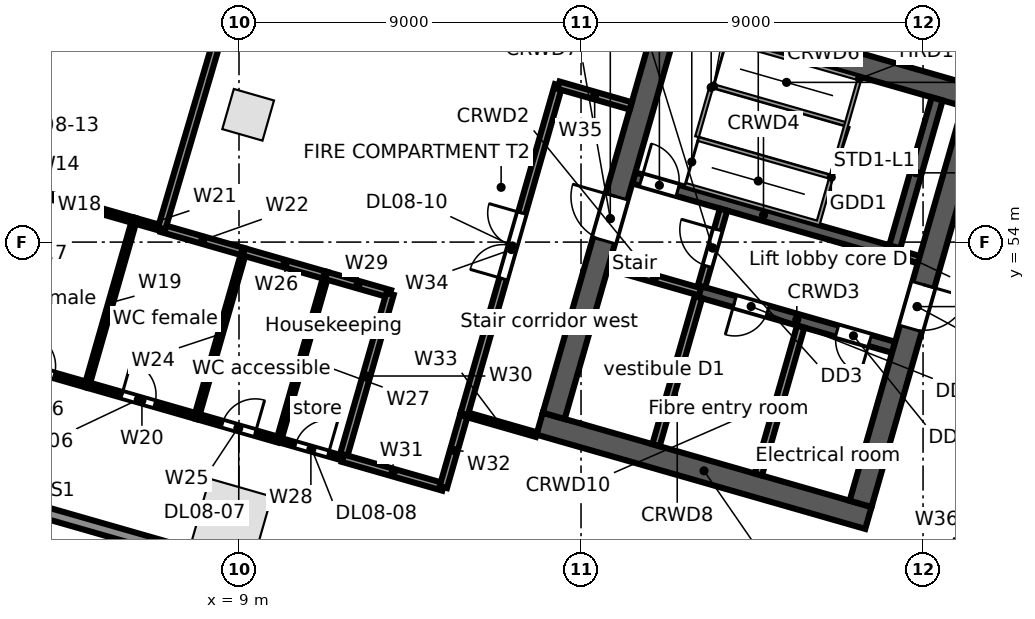
"""IFC4 building model, lengths in metres.
Left out: names, types, materials, properties, quantities, classifications, styles, units other than length and angle.
Written with IfcOpenShell. Run it as: python <this file> out.ifc"""

import sys

from ifc_helpers import new_model, si_unit, direction, frame, frame_2d, origin, origin_2d, place, context, subcontext, project, spatial, rectangle, extrude, element, fill, save


model = new_model("IFC4")
c1 = context("Model", 3, precision=1e-05, world=origin(), true_north=direction((0.0, 1.0)))
c2 = subcontext(c1, "Body", "Model", "MODEL_VIEW")
j1 = project(units=[si_unit("LENGTHUNIT", "METRE"), si_unit("PLANEANGLEUNIT", "RADIAN")], contexts=[c1])
p1 = place(None, origin())
s1 = spatial("IfcSite", under=j1, at=p1, CompositionType="ELEMENT")
p2 = place(p1, origin())
s2 = spatial("IfcBuilding", under=s1, at=p2, CompositionType="ELEMENT")
p3 = place(p2, frame((0.0, 0.0, 41.5)))
s3 = spatial("IfcBuildingStorey", under=s2, at=p3, CompositionType="ELEMENT", Elevation=41.5)
p4 = place(p3, frame((8.81, 46.722, 0.0), z_axis=(0.0, 0.0, 1.0), x_axis=(0.961261695938, -0.275637355817, 0.0)))
e1 = element("IfcColumn", 1, at=p4, inside=s3, PredefinedType="COLUMN", context=c2, shape_type="SweptSolid", body=[
    extrude(rectangle(XDim=1.7, YDim=1.7, at=origin_2d()), origin(), (0.0, 0.0, 1.0), 5.0),
])
p5 = place(p3, frame((9.241, 57.35, 0.0), z_axis=(0.0, 0.0, 1.0), x_axis=(0.961261695938, -0.275637355817, 0.0)))
e2 = element("IfcColumn", 2, at=p5, inside=s3, PredefinedType="COLUMN", context=c2, shape_type="SweptSolid", body=[
    extrude(rectangle(XDim=1.1, YDim=1.1, at=origin_2d()), origin(), (0.0, 0.0, 1.0), 5.0),
])
p6 = place(p3, frame((25.398, 40.717, 0.0), z_axis=(0.0, 0.0, 1.0), x_axis=(-0.961262423262, 0.275634819324, 0.0)))
e3 = element("IfcWall", 3, at=p6, inside=s3, PredefinedType="STANDARD", context=c2, shape_type="SweptSolid", body=[
    extrude(rectangle(XDim=26.359, YDim=0.3, at=frame_2d((13.179, 0.0))), origin(), (0.0, 0.0, 1.0), 4.68),
])
p7 = place(p6, frame((22.664, 0.0, 0.6)))
e4 = element("IfcOpeningElement", 4, at=p7, cuts=e3, PredefinedType="OPENING", context=c2, shape_type="SweptSolid", body=[
    extrude(rectangle(XDim=0.9, YDim=3.2, at=frame_2d((0.45, 1.6))), frame((0.0, 0.16, 0.0), z_axis=(0.0, -1.0, 0.0), x_axis=(1.0, 0.0, 0.0)), (0.0, 0.0, 1.0), 0.32),
])
p8 = place(p6, frame((13.844, 0.0, 0.6)))
e5 = element("IfcOpeningElement", 5, at=p8, cuts=e3, PredefinedType="OPENING", context=c2, shape_type="SweptSolid", body=[
    extrude(rectangle(XDim=0.9, YDim=3.2, at=frame_2d((0.45, 1.6))), frame((0.0, 0.16, 0.0), z_axis=(0.0, -1.0, 0.0), x_axis=(1.0, 0.0, 0.0)), (0.0, 0.0, 1.0), 0.32),
])
p9 = place(p6, frame((5.023, 0.0, 0.6)))
e6 = element("IfcOpeningElement", 6, at=p9, cuts=e3, PredefinedType="OPENING", context=c2, shape_type="SweptSolid", body=[
    extrude(rectangle(XDim=0.9, YDim=3.2, at=frame_2d((0.45, 1.6))), frame((0.0, 0.16, 0.0), z_axis=(0.0, -1.0, 0.0), x_axis=(1.0, 0.0, 0.0)), (0.0, 0.0, 1.0), 0.32),
])
p10 = place(p3, frame((16.911, 49.221, 0.0), z_axis=(0.0, 0.0, 1.0), x_axis=(0.96126248289, -0.275634611374, 0.0)))
e7 = element("IfcWall", 7, at=p10, inside=s3, PredefinedType="SOLIDWALL", context=c2, shape_type="SweptSolid", body=[
    extrude(rectangle(XDim=9.0, YDim=0.6, at=frame_2d((4.5, 0.0))), origin(), (0.0, 0.0, 1.0), 4.68),
])
p11 = place(p3, frame((18.728, 53.382, 0.0), z_axis=(0.0, 0.0, 1.0), x_axis=(0.961247070632, -0.275688355216, 0.0)))
e8 = element("IfcWall", 8, at=p11, inside=s3, PredefinedType="SOLIDWALL", context=c2, shape_type="SweptSolid", body=[
    extrude(rectangle(XDim=2.5, YDim=0.2, at=frame_2d((1.25, 0.0))), origin(), (0.0, 0.0, 1.0), 4.68),
])
p12 = place(p3, frame((21.131, 52.692, 0.0), z_axis=(0.0, 0.0, 1.0), x_axis=(0.961271492568, -0.275603188616, 0.0)))
e9 = element("IfcWall", 9, at=p12, inside=s3, PredefinedType="SOLIDWALL", context=c2, shape_type="SweptSolid", body=[
    extrude(rectangle(XDim=5.3, YDim=0.3, at=frame_2d((2.65, 0.0))), origin(), (0.0, 0.0, 1.0), 4.68),
])
p13 = place(p12, frame((0.95, 0.0, 0.0)))
e10 = element("IfcOpeningElement", 10, at=p13, cuts=e9, PredefinedType="OPENING", context=c2, shape_type="SweptSolid", body=[
    extrude(rectangle(XDim=0.9, YDim=2.1, at=frame_2d((0.45, 1.05))), frame((0.0, 0.16, 0.0), z_axis=(0.0, -1.0, 0.0), x_axis=(1.0, 0.0, 0.0)), (0.0, 0.0, 1.0), 0.32),
])
p14 = place(p12, frame((3.75, 0.0, 0.0)))
e11 = element("IfcOpeningElement", 11, at=p14, cuts=e9, PredefinedType="OPENING", context=c2, shape_type="SweptSolid", body=[
    extrude(rectangle(XDim=0.9, YDim=2.1, at=frame_2d((0.45, 1.05))), frame((0.0, 0.16, 0.0), z_axis=(0.0, -1.0, 0.0), x_axis=(1.0, 0.0, 0.0)), (0.0, 0.0, 1.0), 0.32),
])
p15 = place(p3, frame((19.389, 55.689, 0.0), z_axis=(0.0, 0.0, 1.0), x_axis=(0.961261397636, -0.275638396117, 0.0)))
e12 = element("IfcWall", 12, at=p15, inside=s3, PredefinedType="SOLIDWALL", context=c2, shape_type="SweptSolid", body=[
    extrude(rectangle(XDim=7.1, YDim=0.3, at=frame_2d((3.55, 0.0))), origin(), (0.0, 0.0, 1.0), 4.68),
])
p16 = place(p15, frame((0.2, 0.0, 0.0)))
e13 = element("IfcOpeningElement", 13, at=p16, cuts=e12, PredefinedType="OPENING", context=c2, shape_type="SweptSolid", body=[
    extrude(rectangle(XDim=1.0, YDim=2.1, at=frame_2d((0.5, 1.05))), frame((0.0, 0.16, 0.0), z_axis=(0.0, -1.0, 0.0), x_axis=(1.0, 0.0, 0.0)), (0.0, 0.0, 1.0), 0.32),
])
p17 = place(p3, frame((26.214, 53.732, 0.0), z_axis=(0.0, 0.0, 1.0), x_axis=(0.96122076476, -0.27578005982, 0.0)))
e14 = element("IfcWall", 14, at=p17, inside=s3, PredefinedType="SOLIDWALL", context=c2, shape_type="SweptSolid", body=[
    extrude(rectangle(XDim=0.7, YDim=0.2, at=frame_2d((0.35, 0.0))), origin(), (0.0, 0.0, 1.0), 4.68),
])
p18 = place(p3, frame((20.053, 60.18, 0.0), z_axis=(0.0, 0.0, 1.0), x_axis=(0.96126248289, -0.275634611374, 0.0)))
e15 = element("IfcWall", 15, at=p18, inside=s3, PredefinedType="SOLIDWALL", context=c2, shape_type="SweptSolid", body=[
    extrude(rectangle(XDim=9.0, YDim=0.6, at=frame_2d((4.5, 0.0))), origin(), (0.0, 0.0, 1.0), 4.68),
])
p19 = place(p3, frame((17.282, 49.427, 0.0), z_axis=(0.0, 0.0, 1.0), x_axis=(0.275631631629, 0.961263337304, 0.0)))
e16 = element("IfcWall", 16, at=p19, inside=s3, PredefinedType="SOLIDWALL", context=c2, shape_type="SweptSolid", body=[
    extrude(rectangle(XDim=10.8, YDim=0.6, at=frame_2d((5.4, 0.0))), origin(), (0.0, 0.0, 1.0), 4.68),
])
p20 = place(p19, frame((4.8, 0.0, 0.0)))
e17 = element("IfcOpeningElement", 17, at=p20, cuts=e16, PredefinedType="OPENING", context=c2, shape_type="SweptSolid", body=[
    extrude(rectangle(XDim=1.2, YDim=2.1, at=frame_2d((0.6, 1.05))), frame((0.0, 0.31, 0.0), z_axis=(0.0, -1.0, 0.0), x_axis=(1.0, 0.0, 0.0)), (0.0, 0.0, 1.0), 0.62),
])
p21 = place(p3, frame((19.973, 48.655, 0.0), z_axis=(0.0, 0.0, 1.0), x_axis=(0.275668441653, 0.961252781674, 0.0)))
e18 = element("IfcWall", 18, at=p21, inside=s3, PredefinedType="SOLIDWALL", context=c2, shape_type="SweptSolid", body=[
    extrude(rectangle(XDim=4.05, YDim=0.2, at=frame_2d((2.025, 0.0))), origin(), (0.0, 0.0, 1.0), 4.68),
])
p22 = place(p3, frame((21.172, 52.837, 0.0), z_axis=(0.0, 0.0, 1.0), x_axis=(0.275657676022, 0.961255868981, 0.0)))
e19 = element("IfcWall", 19, at=p22, inside=s3, PredefinedType="PARTITIONING", context=c2, shape_type="SweptSolid", body=[
    extrude(rectangle(XDim=2.1, YDim=0.2, at=frame_2d((1.05, 0.0))), origin(), (0.0, 0.0, 1.0), 4.68),
])
p23 = place(p22, frame((0.55, 0.0, 0.0)))
e20 = element("IfcOpeningElement", 20, at=p23, cuts=e19, PredefinedType="OPENING", context=c2, shape_type="SweptSolid", body=[
    extrude(rectangle(XDim=1.0, YDim=2.1, at=frame_2d((0.5, 1.05))), frame((0.0, 0.11, 0.0), z_axis=(0.0, -1.0, 0.0), x_axis=(1.0, 0.0, 0.0)), (0.0, 0.0, 1.0), 0.22),
])
p24 = place(p3, frame((22.665, 47.883, 0.0), z_axis=(0.0, 0.0, 1.0), x_axis=(0.275596769212, 0.961273333033, 0.0)))
e21 = element("IfcWall", 21, at=p24, inside=s3, PredefinedType="PARTITIONING", context=c2, shape_type="SweptSolid", body=[
    extrude(rectangle(XDim=4.05, YDim=0.2, at=frame_2d((2.025, 0.0))), origin(), (0.0, 0.0, 1.0), 4.68),
])
p25 = place(p3, frame((26.256, 53.876, 0.0), z_axis=(0.0, 0.0, 1.0), x_axis=(0.275612739511, 0.961268754209, 0.0)))
e22 = element("IfcWall", 22, at=p25, inside=s3, PredefinedType="SOLIDWALL", context=c2, shape_type="SweptSolid", body=[
    extrude(rectangle(XDim=4.05, YDim=0.3, at=frame_2d((2.025, 0.0))), origin(), (0.0, 0.0, 1.0), 4.68),
])
p26 = place(p3, frame((25.356, 47.112, 0.0), z_axis=(0.0, 0.0, 1.0), x_axis=(0.275631631629, 0.961263337304, 0.0)))
e23 = element("IfcWall", 23, at=p26, inside=s3, PredefinedType="SOLIDWALL", context=c2, shape_type="SweptSolid", body=[
    extrude(rectangle(XDim=10.8, YDim=0.6, at=frame_2d((5.4, 0.0))), origin(), (0.0, 0.0, 1.0), 4.68),
])
p27 = place(p26, frame((4.8, 0.0, 0.0)))
e24 = element("IfcOpeningElement", 24, at=p27, cuts=e23, PredefinedType="OPENING", context=c2, shape_type="SweptSolid", body=[
    extrude(rectangle(XDim=1.2, YDim=2.1, at=frame_2d((0.6, 1.05))), frame((0.0, 0.31, 0.0), z_axis=(0.0, -1.0, 0.0), x_axis=(1.0, 0.0, 0.0)), (0.0, 0.0, 1.0), 0.62),
])
p28 = place(p3, frame((2.601, 50.932, 0.0), z_axis=(0.0, 0.0, 1.0), x_axis=(0.961265528111, -0.275623991092, 0.0)))
e25 = element("IfcWall", 25, at=p28, inside=s3, PredefinedType="PARTITIONING", context=c2, shape_type="SweptSolid", body=[
    extrude(rectangle(XDim=2.5, YDim=0.15, at=frame_2d((1.25, 0.0))), origin(), (0.0, 0.0, 1.0), 4.68),
])
p29 = place(p28, frame((0.7, 0.0, 0.0)))
e26 = element("IfcOpeningElement", 26, at=p29, cuts=e25, PredefinedType="OPENING", context=c2, shape_type="SweptSolid", body=[
    extrude(rectangle(XDim=0.9, YDim=2.1, at=frame_2d((0.45, 1.05))), frame((0.0, 0.085, 0.0), z_axis=(0.0, -1.0, 0.0), x_axis=(1.0, 0.0, 0.0)), (0.0, 0.0, 1.0), 0.17),
])
p30 = place(p3, frame((3.361, 55.395, 0.0), z_axis=(0.0, 0.0, 1.0), x_axis=(0.961268664977, -0.27561305073, 0.0)))
e27 = element("IfcWall", 27, at=p30, inside=s3, PredefinedType="PARTITIONING", context=c2, shape_type="SweptSolid", body=[
    extrude(rectangle(XDim=3.0, YDim=0.15, at=frame_2d((1.5, 0.0))), origin(), (0.0, 0.0, 1.0), 4.68),
])
p31 = place(p3, frame((5.004, 50.243, 0.0), z_axis=(0.0, 0.0, 1.0), x_axis=(0.275838825927, 0.961203902464, 0.0)))
e28 = element("IfcWall", 28, at=p31, inside=s3, PredefinedType="PARTITIONING", context=c2, shape_type="SweptSolid", body=[
    extrude(rectangle(XDim=4.5, YDim=0.125, at=frame_2d((2.25, 0.0))), origin(), (0.0, 0.0, 1.0), 4.68),
])
p32 = place(p3, frame((5.004, 50.243, 0.0), z_axis=(0.0, 0.0, 1.0), x_axis=(0.961268664977, -0.27561305073, 0.0)))
e29 = element("IfcWall", 29, at=p32, inside=s3, PredefinedType="PARTITIONING", context=c2, shape_type="SweptSolid", body=[
    extrude(rectangle(XDim=3.0, YDim=0.15, at=frame_2d((1.5, 0.0))), origin(), (0.0, 0.0, 1.0), 4.68),
])
p33 = place(p32, frame((0.95, 0.0, 0.0)))
e30 = element("IfcOpeningElement", 30, at=p33, cuts=e29, PredefinedType="OPENING", context=c2, shape_type="SweptSolid", body=[
    extrude(rectangle(XDim=0.9, YDim=2.1, at=frame_2d((0.45, 1.05))), frame((0.0, 0.085, 0.0), z_axis=(0.0, -1.0, 0.0), x_axis=(1.0, 0.0, 0.0)), (0.0, 0.0, 1.0), 0.17),
])
p34 = place(p3, frame((6.245, 54.568, 0.0), z_axis=(0.0, 0.0, 1.0), x_axis=(0.961499370144, -0.274807134575, 0.0)))
e31 = element("IfcWall", 31, at=p34, inside=s3, PredefinedType="PARTITIONING", context=c2, shape_type="SweptSolid", body=[
    extrude(rectangle(XDim=0.75, YDim=0.15, at=frame_2d((0.375, 0.0))), origin(), (0.0, 0.0, 1.0), 4.68),
])
p35 = place(p3, frame((6.966, 54.362, 0.0), z_axis=(0.0, 0.0, 1.0), x_axis=(0.961154610169, -0.276010534854, 0.0)))
e32 = element("IfcWall", 32, at=p35, inside=s3, PredefinedType="PARTITIONING", context=c2, shape_type="SweptSolid", body=[
    extrude(rectangle(XDim=2.25, YDim=0.2, at=frame_2d((1.125, 0.0))), origin(), (0.0, 0.0, 1.0), 3.852),
])
p36 = place(p3, frame((6.966, 54.362, 0.0), z_axis=(0.0, 0.0, 1.0), x_axis=(0.283027392509, 0.959111826165, 0.0)))
e33 = element("IfcWall", 33, at=p36, inside=s3, PredefinedType="PARTITIONING", context=c2, shape_type="SweptSolid", body=[
    extrude(rectangle(XDim=12.985, YDim=0.2, at=frame_2d((6.492, 0.0))), origin(), (0.0, 0.0, 1.0), 3.742),
])
p37 = place(p3, frame((7.888, 49.416, 0.0), z_axis=(0.0, 0.0, 1.0), x_axis=(0.275803080638, 0.96121415965, 0.0)))
e34 = element("IfcWall", 34, at=p37, inside=s3, PredefinedType="PARTITIONING", context=c2, shape_type="SweptSolid", body=[
    extrude(rectangle(XDim=4.5, YDim=0.125, at=frame_2d((2.25, 0.0))), origin(), (0.0, 0.0, 1.0), 3.852),
])
p38 = place(p3, frame((7.888, 49.416, 0.0), z_axis=(0.0, 0.0, 1.0), x_axis=(0.9611628742, -0.275981755301, 0.0)))
e35 = element("IfcWall", 35, at=p38, inside=s3, PredefinedType="PARTITIONING", context=c2, shape_type="SweptSolid", body=[
    extrude(rectangle(XDim=2.25, YDim=0.15, at=frame_2d((1.125, 0.0))), origin(), (0.0, 0.0, 1.0), 3.742),
])
p39 = place(p38, frame((0.7, 0.0, 0.0)))
e36 = element("IfcOpeningElement", 36, at=p39, cuts=e35, PredefinedType="OPENING", context=c2, shape_type="SweptSolid", body=[
    extrude(rectangle(XDim=0.9, YDim=2.1, at=frame_2d((0.45, 1.05))), frame((0.0, 0.085, 0.0), z_axis=(0.0, -1.0, 0.0), x_axis=(1.0, 0.0, 0.0)), (0.0, 0.0, 1.0), 0.17),
])
p40 = place(p3, frame((9.129, 53.741, 0.0), z_axis=(0.0, 0.0, 1.0), x_axis=(0.961273691875, -0.275595517578, 0.0)))
e37 = element("IfcWall", 37, at=p40, inside=s3, PredefinedType="PARTITIONING", context=c2, shape_type="SweptSolid", body=[
    extrude(rectangle(XDim=2.249, YDim=0.2, at=frame_2d((1.125, 0.0))), origin(), (0.0, 0.0, 1.0), 3.742),
])
p41 = place(p3, frame((10.051, 48.795, 0.0), z_axis=(0.0, 0.0, 1.0), x_axis=(0.275530671241, 0.961292280841, 0.0)))
e38 = element("IfcWall", 38, at=p41, inside=s3, PredefinedType="PARTITIONING", context=c2, shape_type="SweptSolid", body=[
    extrude(rectangle(XDim=4.5, YDim=0.125, at=frame_2d((2.25, 0.0))), origin(), (0.0, 0.0, 1.0), 4.68),
])
p42 = place(p3, frame((10.051, 48.795, 0.0), z_axis=(0.0, 0.0, 1.0), x_axis=(0.961313033798, -0.275458256455, 0.0)))
e39 = element("IfcWall", 39, at=p42, inside=s3, PredefinedType="PARTITIONING", context=c2, shape_type="SweptSolid", body=[
    extrude(rectangle(XDim=1.75, YDim=0.125, at=frame_2d((0.875, 0.0))), origin(), (0.0, 0.0, 1.0), 4.68),
])
p43 = place(p42, frame((0.45, 0.0, 0.0)))
e40 = element("IfcOpeningElement", 40, at=p43, cuts=e39, PredefinedType="OPENING", context=c2, shape_type="SweptSolid", body=[
    extrude(rectangle(XDim=0.9, YDim=2.1, at=frame_2d((0.45, 1.05))), frame((0.0, 0.073, 0.0), z_axis=(0.0, -1.0, 0.0), x_axis=(1.0, 0.0, 0.0)), (0.0, 0.0, 1.0), 0.145),
])
p44 = place(p3, frame((11.291, 53.121, 0.0), z_axis=(0.0, 0.0, 1.0), x_axis=(0.961329010357, -0.275402494264, 0.0)))
e41 = element("IfcWall", 41, at=p44, inside=s3, PredefinedType="PARTITIONING", context=c2, shape_type="SweptSolid", body=[
    extrude(rectangle(XDim=1.751, YDim=0.2, at=frame_2d((0.875, 0.0))), origin(), (0.0, 0.0, 1.0), 4.68),
])
p45 = place(p3, frame((11.733, 48.313, 0.0), z_axis=(0.0, 0.0, 1.0), x_axis=(0.275795676316, 0.961216284155, 0.0)))
e42 = element("IfcWall", 42, at=p45, inside=s3, PredefinedType="PARTITIONING", context=c2, shape_type="SweptSolid", body=[
    extrude(rectangle(XDim=4.5, YDim=0.2, at=frame_2d((2.25, 0.0))), origin(), (0.0, 0.0, 1.0), 4.68),
])
p46 = place(p3, frame((11.733, 48.313, 0.0), z_axis=(0.0, 0.0, 1.0), x_axis=(0.961272337704, -0.275600240865, 0.0)))
e43 = element("IfcWall", 43, at=p46, inside=s3, PredefinedType="PARTITIONING", context=c2, shape_type="SweptSolid", body=[
    extrude(rectangle(XDim=2.75, YDim=0.2, at=frame_2d((1.375, 0.0))), origin(), (0.0, 0.0, 1.0), 4.68),
])
p47 = place(p3, frame((14.377, 47.555, 0.0), z_axis=(0.0, 0.0, 1.0), x_axis=(0.275446387355, 0.961316434736, 0.0)))
e44 = element("IfcWall", 44, at=p47, inside=s3, PredefinedType="PARTITIONING", context=c2, shape_type="SweptSolid", body=[
    extrude(rectangle(XDim=2.0, YDim=0.2, at=frame_2d((1.0, 0.0))), origin(), (0.0, 0.0, 1.0), 4.68),
])
p48 = place(p3, frame((14.928, 49.478, 0.0), z_axis=(0.0, 0.0, 1.0), x_axis=(0.961243778232, -0.27569983462, 0.0)))
e45 = element("IfcWall", 45, at=p48, inside=s3, PredefinedType="PARTITIONING", context=c2, shape_type="SweptSolid", body=[
    extrude(rectangle(XDim=1.977, YDim=0.125, at=frame_2d((0.988, 0.0))), origin(), (0.0, 0.0, 1.0), 4.68),
])
p49 = place(p3, frame((14.928, 49.478, 0.0), z_axis=(0.0, 0.0, 1.0), x_axis=(0.275674053528, 0.961251172281, 0.0)))
e46 = element("IfcWall", 46, at=p49, inside=s3, PredefinedType="PARTITIONING", context=c2, shape_type="SweptSolid", body=[
    extrude(rectangle(XDim=9.0, YDim=0.2, at=frame_2d((4.5, 0.0))), origin(), (0.0, 0.0, 1.0), 3.742),
])
p50 = place(p49, frame((3.7, 0.0, 0.0)))
e47 = element("IfcOpeningElement", 47, at=p50, cuts=e46, PredefinedType="OPENING", context=c2, shape_type="SweptSolid", body=[
    extrude(rectangle(XDim=1.8, YDim=2.1, at=frame_2d((0.9, 1.05))), frame((0.0, 0.11, 0.0), z_axis=(0.0, -1.0, 0.0), x_axis=(1.0, 0.0, 0.0)), (0.0, 0.0, 1.0), 0.22),
])
p51 = place(p3, frame((17.409, 58.129, 0.0), z_axis=(0.0, 0.0, 1.0), x_axis=(0.961253165474, -0.275667103345, 0.0)))
e48 = element("IfcWall", 48, at=p51, inside=s3, PredefinedType="PARTITIONING", context=c2, shape_type="SweptSolid", body=[
    extrude(rectangle(XDim=1.977, YDim=0.2, at=frame_2d((0.988, 0.0))), origin(), (0.0, 0.0, 1.0), 4.68),
])
p52 = place(p3, frame((26.456, 42.338, 0.0), z_axis=(0.0, 0.0, 1.0), x_axis=(0.52980027265, 0.848122438743, 0.0)))
e49 = element("IfcWall", 49, at=p52, inside=s3, PredefinedType="PARTITIONING", context=c2, shape_type="SweptSolid", body=[
    extrude(rectangle(XDim=6.076, YDim=0.25, at=frame_2d((3.038, 0.0))), origin(), (0.0, 0.0, 1.0), 4.68),
])
p53 = place(p52, frame((2.2, 0.0, 0.0)))
e50 = element("IfcOpeningElement", 50, at=p53, cuts=e49, PredefinedType="OPENING", context=c2, shape_type="SweptSolid", body=[
    extrude(rectangle(XDim=1.8, YDim=2.1, at=frame_2d((0.9, 1.05))), frame((0.0, 0.135, 0.0), z_axis=(0.0, -1.0, 0.0), x_axis=(1.0, 0.0, 0.0)), (0.0, 0.0, 1.0), 0.27),
])
p54 = place(p16, origin())
e51 = element("IfcDoor", 51, at=p54, inside=s3, OperationType="SINGLE_SWING_LEFT", PredefinedType="DOOR", context=c2, shape_type="SweptSolid", body=[
    extrude(rectangle(XDim=1.0, YDim=2.1, at=frame_2d((0.5, 1.05))), frame((0.0, 0.025, 0.0), z_axis=(0.0, -1.0, 0.0), x_axis=(1.0, 0.0, 0.0)), (0.0, 0.0, 1.0), 0.05),
])
fill(e13, e51)
p55 = place(p23, origin())
e52 = element("IfcDoor", 52, at=p55, inside=s3, OperationType="SINGLE_SWING_RIGHT", PredefinedType="DOOR", context=c2, shape_type="SweptSolid", body=[
    extrude(rectangle(XDim=1.0, YDim=2.1, at=frame_2d((0.5, 1.05))), frame((0.0, 0.025, 0.0), z_axis=(0.0, -1.0, 0.0), x_axis=(1.0, 0.0, 0.0)), (0.0, 0.0, 1.0), 0.05),
])
fill(e20, e52)
p56 = place(p20, origin())
e53 = element("IfcDoor", 53, at=p56, inside=s3, OperationType="SINGLE_SWING_RIGHT", PredefinedType="DOOR", context=c2, shape_type="SweptSolid", body=[
    extrude(rectangle(XDim=1.2, YDim=2.1, at=frame_2d((0.6, 1.05))), frame((0.0, 0.025, 0.0), z_axis=(0.0, -1.0, 0.0), x_axis=(1.0, 0.0, 0.0)), (0.0, 0.0, 1.0), 0.05),
])
fill(e17, e53)
p57 = place(p27, frame((1.2, 0.0, 0.0), z_axis=(0.0, 0.0, 1.0), x_axis=(-1.0, 0.0, 0.0)))
e54 = element("IfcDoor", 54, at=p57, inside=s3, OperationType="SINGLE_SWING_LEFT", PredefinedType="DOOR", context=c2, shape_type="SweptSolid", body=[
    extrude(rectangle(XDim=1.2, YDim=2.1, at=frame_2d((0.6, 1.05))), frame((0.0, 0.025, 0.0), z_axis=(0.0, -1.0, 0.0), x_axis=(1.0, 0.0, 0.0)), (0.0, 0.0, 1.0), 0.05),
])
fill(e24, e54)
p58 = place(p13, frame((0.9, 0.0, 0.0), z_axis=(0.0, 0.0, 1.0), x_axis=(-1.0, 0.0, 0.0)))
e55 = element("IfcDoor", 55, at=p58, inside=s3, OperationType="SINGLE_SWING_RIGHT", PredefinedType="DOOR", context=c2, shape_type="SweptSolid", body=[
    extrude(rectangle(XDim=0.9, YDim=2.1, at=frame_2d((0.45, 1.05))), frame((0.0, 0.025, 0.0), z_axis=(0.0, -1.0, 0.0), x_axis=(1.0, 0.0, 0.0)), (0.0, 0.0, 1.0), 0.05),
])
fill(e10, e55)
p59 = place(p14, frame((0.9, 0.0, 0.0), z_axis=(0.0, 0.0, 1.0), x_axis=(-1.0, 0.0, 0.0)))
e56 = element("IfcDoor", 56, at=p59, inside=s3, OperationType="SINGLE_SWING_LEFT", PredefinedType="DOOR", context=c2, shape_type="SweptSolid", body=[
    extrude(rectangle(XDim=0.9, YDim=2.1, at=frame_2d((0.45, 1.05))), frame((0.0, 0.025, 0.0), z_axis=(0.0, -1.0, 0.0), x_axis=(1.0, 0.0, 0.0)), (0.0, 0.0, 1.0), 0.05),
])
fill(e11, e56)
p60 = place(p29, origin())
e57 = element("IfcDoor", 57, at=p60, inside=s3, OperationType="SINGLE_SWING_LEFT", PredefinedType="DOOR", context=c2, shape_type="SweptSolid", body=[
    extrude(rectangle(XDim=0.9, YDim=2.1, at=frame_2d((0.45, 1.05))), frame((0.0, 0.025, 0.0), z_axis=(0.0, -1.0, 0.0), x_axis=(1.0, 0.0, 0.0)), (0.0, 0.0, 1.0), 0.05),
])
fill(e26, e57)
p61 = place(p33, origin())
e58 = element("IfcDoor", 58, at=p61, inside=s3, OperationType="SINGLE_SWING_LEFT", PredefinedType="DOOR", context=c2, shape_type="SweptSolid", body=[
    extrude(rectangle(XDim=0.9, YDim=2.1, at=frame_2d((0.45, 1.05))), frame((0.0, 0.025, 0.0), z_axis=(0.0, -1.0, 0.0), x_axis=(1.0, 0.0, 0.0)), (0.0, 0.0, 1.0), 0.05),
])
fill(e30, e58)
p62 = place(p39, origin())
e59 = element("IfcDoor", 59, at=p62, inside=s3, OperationType="SINGLE_SWING_RIGHT", PredefinedType="DOOR", context=c2, shape_type="SweptSolid", body=[
    extrude(rectangle(XDim=0.9, YDim=2.1, at=frame_2d((0.45, 1.05))), frame((0.0, 0.025, 0.0), z_axis=(0.0, -1.0, 0.0), x_axis=(1.0, 0.0, 0.0)), (0.0, 0.0, 1.0), 0.05),
])
fill(e36, e59)
p63 = place(p43, origin())
e60 = element("IfcDoor", 60, at=p63, inside=s3, OperationType="SINGLE_SWING_RIGHT", PredefinedType="DOOR", context=c2, shape_type="SweptSolid", body=[
    extrude(rectangle(XDim=0.9, YDim=2.1, at=frame_2d((0.45, 1.05))), frame((0.0, 0.025, 0.0), z_axis=(0.0, -1.0, 0.0), x_axis=(1.0, 0.0, 0.0)), (0.0, 0.0, 1.0), 0.05),
])
fill(e40, e60)
p64 = place(p50, origin())
e61 = element("IfcDoor", 61, at=p64, inside=s3, OperationType="DOUBLE_DOOR_SINGLE_SWING", PredefinedType="DOOR", context=c2, shape_type="SweptSolid", body=[
    extrude(rectangle(XDim=1.8, YDim=2.1, at=frame_2d((0.9, 1.05))), frame((0.0, 0.025, 0.0), z_axis=(0.0, -1.0, 0.0), x_axis=(1.0, 0.0, 0.0)), (0.0, 0.0, 1.0), 0.05),
])
fill(e47, e61)
save(model, sys.argv[1])
